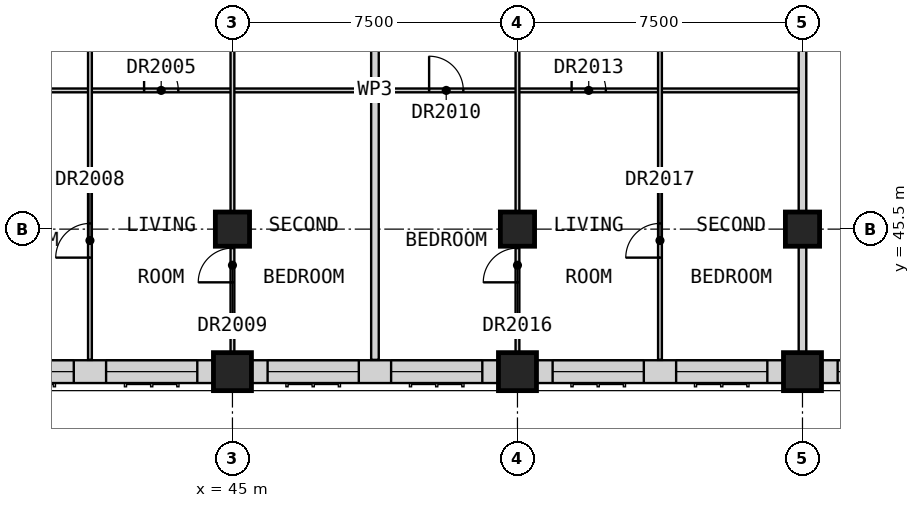
"""IFC4 building model, lengths in metres.
Left out: names, types, materials, properties, quantities, classifications, styles, units other than length and angle.
Written with IfcOpenShell. Run it as: python <this file> out.ifc"""

import sys

from ifc_helpers import new_model, si_unit, direction, frame, frame_2d, origin, origin_2d, place, context, subcontext, project, spatial, rectangle, extrude, element, fill, save


model = new_model("IFC4")
c1 = context("Model", 3, precision=1e-05, world=origin(), true_north=direction((0.0, 1.0)))
c2 = subcontext(c1, "Body", "Model", "MODEL_VIEW")
j1 = project(units=[si_unit("LENGTHUNIT", "METRE"), si_unit("PLANEANGLEUNIT", "RADIAN")], contexts=[c1])
p1 = place(None, origin())
s1 = spatial("IfcSite", under=j1, at=p1, CompositionType="ELEMENT")
p2 = place(p1, origin())
s2 = spatial("IfcBuilding", under=s1, at=p2, CompositionType="ELEMENT")
p3 = place(p2, frame((0.0, 0.0, 210.7)))
s3 = spatial("IfcBuildingStorey", under=s2, at=p3, CompositionType="ELEMENT", Elevation=210.7)
for number, where, z_axis, x_axis in (
    (1, (45.0, 41.75, 0.0), (0.0, 0.0, 1.0), (1.0, 0.0, 0.0)),
    (2, (52.5, 41.75, 0.0), (0.0, 0.0, 1.0), (1.0, 0.0, 0.0)),
    (3, (60.0, 41.75, 0.0), (0.0, 0.0, 1.0), (1.0, 0.0, 0.0)),
):
    element("IfcColumn", number, at=place(p3, frame(where, z_axis=z_axis, x_axis=x_axis)), inside=s3, PredefinedType="COLUMN", context=c2, shape_type="SweptSolid", body=[
        extrude(rectangle(XDim=1.0, YDim=1.0, at=origin_2d()), origin(), (0.0, 0.0, 1.0), 3.5),
    ])
for number, where, z_axis, x_axis in (
    (4, (45.0, 45.5, 0.0), (0.0, 0.0, 1.0), (1.0, 0.0, 0.0)),
    (5, (52.5, 45.5, 0.0), (0.0, 0.0, 1.0), (1.0, 0.0, 0.0)),
    (6, (60.0, 45.5, 0.0), (0.0, 0.0, 1.0), (1.0, 0.0, 0.0)),
):
    element("IfcColumn", number, at=place(p3, frame(where, z_axis=z_axis, x_axis=x_axis)), inside=s3, PredefinedType="COLUMN", context=c2, shape_type="SweptSolid", body=[
        extrude(rectangle(XDim=0.9, YDim=0.9, at=origin_2d()), origin(), (0.0, 0.0, 1.0), 3.5),
    ])
p4 = place(p3, frame((38.0, 41.75, 0.0), z_axis=(0.0, 0.0, 1.0), x_axis=(1.0, 0.0, 0.0)))
e7 = element("IfcWall", 7, at=p4, inside=s3, PredefinedType="SOLIDWALL", context=c2, shape_type="SweptSolid", body=[
    extrude(rectangle(XDim=6.5, YDim=0.6, at=frame_2d((3.25, 0.0))), origin(), (0.0, 0.0, 1.0), 2.75),
])
p5 = place(p4, frame((0.425, 0.0, 0.8)))
e8 = element("IfcOpeningElement", 8, at=p5, cuts=e7, PredefinedType="OPENING", context=c2, shape_type="SweptSolid", body=[
    extrude(rectangle(XDim=2.4, YDim=1.8, at=frame_2d((1.2, 0.9))), frame((0.0, 0.31, 0.0), z_axis=(0.0, -1.0, 0.0), x_axis=(1.0, 0.0, 0.0)), (0.0, 0.0, 1.0), 0.62),
])
p6 = place(p4, frame((3.675, 0.0, 0.8)))
e9 = element("IfcOpeningElement", 9, at=p6, cuts=e7, PredefinedType="OPENING", context=c2, shape_type="SweptSolid", body=[
    extrude(rectangle(XDim=2.4, YDim=1.8, at=frame_2d((1.2, 0.9))), frame((0.0, 0.31, 0.0), z_axis=(0.0, -1.0, 0.0), x_axis=(1.0, 0.0, 0.0)), (0.0, 0.0, 1.0), 0.62),
])
p7 = place(p3, frame((45.5, 41.75, 0.0), z_axis=(0.0, 0.0, 1.0), x_axis=(1.0, 0.0, 0.0)))
e10 = element("IfcWall", 10, at=p7, inside=s3, PredefinedType="SOLIDWALL", context=c2, shape_type="SweptSolid", body=[
    extrude(rectangle(XDim=6.5, YDim=0.6, at=frame_2d((3.25, 0.0))), origin(), (0.0, 0.0, 1.0), 2.75),
])
p8 = place(p7, frame((0.425, 0.0, 0.8)))
e11 = element("IfcOpeningElement", 11, at=p8, cuts=e10, PredefinedType="OPENING", context=c2, shape_type="SweptSolid", body=[
    extrude(rectangle(XDim=2.4, YDim=1.8, at=frame_2d((1.2, 0.9))), frame((0.0, 0.31, 0.0), z_axis=(0.0, -1.0, 0.0), x_axis=(1.0, 0.0, 0.0)), (0.0, 0.0, 1.0), 0.62),
])
p9 = place(p7, frame((3.675, 0.0, 0.8)))
e12 = element("IfcOpeningElement", 12, at=p9, cuts=e10, PredefinedType="OPENING", context=c2, shape_type="SweptSolid", body=[
    extrude(rectangle(XDim=2.4, YDim=1.8, at=frame_2d((1.2, 0.9))), frame((0.0, 0.31, 0.0), z_axis=(0.0, -1.0, 0.0), x_axis=(1.0, 0.0, 0.0)), (0.0, 0.0, 1.0), 0.62),
])
p10 = place(p3, frame((53.0, 41.75, 0.0), z_axis=(0.0, 0.0, 1.0), x_axis=(1.0, 0.0, 0.0)))
e13 = element("IfcWall", 13, at=p10, inside=s3, PredefinedType="SOLIDWALL", context=c2, shape_type="SweptSolid", body=[
    extrude(rectangle(XDim=6.5, YDim=0.6, at=frame_2d((3.25, 0.0))), origin(), (0.0, 0.0, 1.0), 2.75),
])
p11 = place(p10, frame((0.425, 0.0, 0.8)))
e14 = element("IfcOpeningElement", 14, at=p11, cuts=e13, PredefinedType="OPENING", context=c2, shape_type="SweptSolid", body=[
    extrude(rectangle(XDim=2.4, YDim=1.8, at=frame_2d((1.2, 0.9))), frame((0.0, 0.31, 0.0), z_axis=(0.0, -1.0, 0.0), x_axis=(1.0, 0.0, 0.0)), (0.0, 0.0, 1.0), 0.62),
])
p12 = place(p10, frame((3.675, 0.0, 0.8)))
e15 = element("IfcOpeningElement", 15, at=p12, cuts=e13, PredefinedType="OPENING", context=c2, shape_type="SweptSolid", body=[
    extrude(rectangle(XDim=2.4, YDim=1.8, at=frame_2d((1.2, 0.9))), frame((0.0, 0.31, 0.0), z_axis=(0.0, -1.0, 0.0), x_axis=(1.0, 0.0, 0.0)), (0.0, 0.0, 1.0), 0.62),
])
p13 = place(p3, frame((60.5, 41.75, 0.0), z_axis=(0.0, 0.0, 1.0), x_axis=(1.0, 0.0, 0.0)))
e16 = element("IfcWall", 16, at=p13, inside=s3, PredefinedType="SOLIDWALL", context=c2, shape_type="SweptSolid", body=[
    extrude(rectangle(XDim=6.5, YDim=0.6, at=frame_2d((3.25, 0.0))), origin(), (0.0, 0.0, 1.0), 2.75),
])
p14 = place(p13, frame((0.425, 0.0, 0.8)))
e17 = element("IfcOpeningElement", 17, at=p14, cuts=e16, PredefinedType="OPENING", context=c2, shape_type="SweptSolid", body=[
    extrude(rectangle(XDim=2.4, YDim=1.8, at=frame_2d((1.2, 0.9))), frame((0.0, 0.31, 0.0), z_axis=(0.0, -1.0, 0.0), x_axis=(1.0, 0.0, 0.0)), (0.0, 0.0, 1.0), 0.62),
])
p15 = place(p13, frame((3.675, 0.0, 0.8)))
e18 = element("IfcOpeningElement", 18, at=p15, cuts=e16, PredefinedType="OPENING", context=c2, shape_type="SweptSolid", body=[
    extrude(rectangle(XDim=2.4, YDim=1.8, at=frame_2d((1.2, 0.9))), frame((0.0, 0.31, 0.0), z_axis=(0.0, -1.0, 0.0), x_axis=(1.0, 0.0, 0.0)), (0.0, 0.0, 1.0), 0.62),
])
p16 = place(p3, frame((48.75, 42.06, 0.0), z_axis=(0.0, 0.0, 1.0), x_axis=(0.0, 1.0, 0.0)))
e19 = element("IfcWall", 19, at=p16, inside=s3, PredefinedType="PARTITIONING", context=c2, shape_type="SweptSolid", body=[
    extrude(rectangle(XDim=15.765, YDim=0.2, at=frame_2d((7.882, 0.0))), origin(), (0.0, 0.0, 1.0), 3.1),
])
p17 = place(p3, frame((60.0, 41.25, 0.0), z_axis=(0.0, 0.0, 1.0), x_axis=(0.0, 1.0, 0.0)))
e20 = element("IfcWall", 20, at=p17, inside=s3, PredefinedType="PARTITIONING", context=c2, shape_type="SweptSolid", body=[
    extrude(rectangle(XDim=16.575, YDim=0.2, at=frame_2d((8.288, 0.0))), origin(), (0.0, 0.0, 1.0), 3.1),
])
p18 = place(p3, frame((37.6, 49.15, 0.0), z_axis=(0.0, 0.0, 1.0), x_axis=(1.0, 0.0, 0.0)))
e21 = element("IfcWall", 21, at=p18, inside=s3, PredefinedType="PARTITIONING", context=c2, shape_type="SweptSolid", body=[
    extrude(rectangle(XDim=22.3, YDim=0.1, at=frame_2d((11.15, 0.0))), origin(), (0.0, 0.0, 1.0), 3.1),
])
p19 = place(p18, frame((1.325, 0.0, 0.0)))
e22 = element("IfcOpeningElement", 22, at=p19, cuts=e21, PredefinedType="OPENING", context=c2, shape_type="SweptSolid", body=[
    extrude(rectangle(XDim=0.9, YDim=2.1, at=frame_2d((0.45, 1.05))), frame((0.0, 0.06, 0.0), z_axis=(0.0, -1.0, 0.0), x_axis=(1.0, 0.0, 0.0)), (0.0, 0.0, 1.0), 0.12),
])
p20 = place(p18, frame((5.075, 0.0, 0.0)))
e23 = element("IfcOpeningElement", 23, at=p20, cuts=e21, PredefinedType="OPENING", context=c2, shape_type="SweptSolid", body=[
    extrude(rectangle(XDim=0.9, YDim=2.1, at=frame_2d((0.45, 1.05))), frame((0.0, 0.06, 0.0), z_axis=(0.0, -1.0, 0.0), x_axis=(1.0, 0.0, 0.0)), (0.0, 0.0, 1.0), 0.12),
])
p21 = place(p18, frame((12.575, 0.0, 0.0)))
e24 = element("IfcOpeningElement", 24, at=p21, cuts=e21, PredefinedType="OPENING", context=c2, shape_type="SweptSolid", body=[
    extrude(rectangle(XDim=0.9, YDim=2.1, at=frame_2d((0.45, 1.05))), frame((0.0, 0.06, 0.0), z_axis=(0.0, -1.0, 0.0), x_axis=(1.0, 0.0, 0.0)), (0.0, 0.0, 1.0), 0.12),
])
p22 = place(p18, frame((16.325, 0.0, 0.0)))
e25 = element("IfcOpeningElement", 25, at=p22, cuts=e21, PredefinedType="OPENING", context=c2, shape_type="SweptSolid", body=[
    extrude(rectangle(XDim=0.9, YDim=2.1, at=frame_2d((0.45, 1.05))), frame((0.0, 0.06, 0.0), z_axis=(0.0, -1.0, 0.0), x_axis=(1.0, 0.0, 0.0)), (0.0, 0.0, 1.0), 0.12),
])
p23 = place(p3, frame((41.25, 42.06, 0.0), z_axis=(0.0, 0.0, 1.0), x_axis=(0.0, 1.0, 0.0)))
e26 = element("IfcWall", 26, at=p23, inside=s3, PredefinedType="PARTITIONING", context=c2, shape_type="SweptSolid", body=[
    extrude(rectangle(XDim=11.402, YDim=0.1, at=frame_2d((5.701, 0.0))), origin(), (0.0, 0.0, 1.0), 3.1),
])
p24 = place(p23, frame((2.69, 0.0, 0.0)))
e27 = element("IfcOpeningElement", 27, at=p24, cuts=e26, PredefinedType="OPENING", context=c2, shape_type="SweptSolid", body=[
    extrude(rectangle(XDim=0.9, YDim=2.1, at=frame_2d((0.45, 1.05))), frame((0.0, 0.06, 0.0), z_axis=(0.0, -1.0, 0.0), x_axis=(1.0, 0.0, 0.0)), (0.0, 0.0, 1.0), 0.12),
])
p25 = place(p3, frame((45.0, 41.25, 0.0), z_axis=(0.0, 0.0, 1.0), x_axis=(0.0, 1.0, 0.0)))
e28 = element("IfcWall", 28, at=p25, inside=s3, PredefinedType="PARTITIONING", context=c2, shape_type="SweptSolid", body=[
    extrude(rectangle(XDim=12.212, YDim=0.1, at=frame_2d((6.106, 0.0))), origin(), (0.0, 0.0, 1.0), 3.1),
])
p26 = place(p25, frame((9.637, 0.0, 0.0)))
e29 = element("IfcOpeningElement", 29, at=p26, cuts=e28, PredefinedType="OPENING", context=c2, shape_type="SweptSolid", body=[
    extrude(rectangle(XDim=0.9, YDim=2.1, at=frame_2d((0.45, 1.05))), frame((0.0, 0.06, 0.0), z_axis=(0.0, -1.0, 0.0), x_axis=(1.0, 0.0, 0.0)), (0.0, 0.0, 1.0), 0.12),
])
p27 = place(p25, frame((2.85, 0.0, 0.0)))
e30 = element("IfcOpeningElement", 30, at=p27, cuts=e28, PredefinedType="OPENING", context=c2, shape_type="SweptSolid", body=[
    extrude(rectangle(XDim=0.9, YDim=2.1, at=frame_2d((0.45, 1.05))), frame((0.0, 0.06, 0.0), z_axis=(0.0, -1.0, 0.0), x_axis=(1.0, 0.0, 0.0)), (0.0, 0.0, 1.0), 0.12),
])
p28 = place(p3, frame((52.5, 41.25, 0.0), z_axis=(0.0, 0.0, 1.0), x_axis=(0.0, 1.0, 0.0)))
e31 = element("IfcWall", 31, at=p28, inside=s3, PredefinedType="PARTITIONING", context=c2, shape_type="SweptSolid", body=[
    extrude(rectangle(XDim=12.212, YDim=0.1, at=frame_2d((6.106, 0.0))), origin(), (0.0, 0.0, 1.0), 3.1),
])
p29 = place(p28, frame((2.85, 0.0, 0.0)))
e32 = element("IfcOpeningElement", 32, at=p29, cuts=e31, PredefinedType="OPENING", context=c2, shape_type="SweptSolid", body=[
    extrude(rectangle(XDim=0.9, YDim=2.1, at=frame_2d((0.45, 1.05))), frame((0.0, 0.06, 0.0), z_axis=(0.0, -1.0, 0.0), x_axis=(1.0, 0.0, 0.0)), (0.0, 0.0, 1.0), 0.12),
])
p30 = place(p3, frame((56.25, 42.06, 0.0), z_axis=(0.0, 0.0, 1.0), x_axis=(0.0, 1.0, 0.0)))
e33 = element("IfcWall", 33, at=p30, inside=s3, PredefinedType="PARTITIONING", context=c2, shape_type="SweptSolid", body=[
    extrude(rectangle(XDim=11.402, YDim=0.1, at=frame_2d((5.701, 0.0))), origin(), (0.0, 0.0, 1.0), 3.1),
])
p31 = place(p30, frame((8.827, 0.0, 0.0)))
e34 = element("IfcOpeningElement", 34, at=p31, cuts=e33, PredefinedType="OPENING", context=c2, shape_type="SweptSolid", body=[
    extrude(rectangle(XDim=0.9, YDim=2.1, at=frame_2d((0.45, 1.05))), frame((0.0, 0.06, 0.0), z_axis=(0.0, -1.0, 0.0), x_axis=(1.0, 0.0, 0.0)), (0.0, 0.0, 1.0), 0.12),
])
p32 = place(p30, frame((2.69, 0.0, 0.0)))
e35 = element("IfcOpeningElement", 35, at=p32, cuts=e33, PredefinedType="OPENING", context=c2, shape_type="SweptSolid", body=[
    extrude(rectangle(XDim=0.9, YDim=2.1, at=frame_2d((0.45, 1.05))), frame((0.0, 0.06, 0.0), z_axis=(0.0, -1.0, 0.0), x_axis=(1.0, 0.0, 0.0)), (0.0, 0.0, 1.0), 0.12),
])
p33 = place(p5, origin())
e36 = element("IfcWindow", 36, at=p33, inside=s3, PartitioningType="SINGLE_PANEL", PredefinedType="WINDOW", context=c2, shape_type="SweptSolid", body=[
    extrude(rectangle(XDim=2.4, YDim=1.8, at=frame_2d((1.2, 0.9))), frame((0.0, -0.07, 0.0), z_axis=(0.0, -1.0, 0.0), x_axis=(1.0, 0.0, 0.0)), (0.0, 0.0, 1.0), 0.06),
])
fill(e8, e36)
p34 = place(p6, origin())
e37 = element("IfcWindow", 37, at=p34, inside=s3, PartitioningType="SINGLE_PANEL", PredefinedType="WINDOW", context=c2, shape_type="SweptSolid", body=[
    extrude(rectangle(XDim=2.4, YDim=1.8, at=frame_2d((1.2, 0.9))), frame((0.0, -0.07, 0.0), z_axis=(0.0, -1.0, 0.0), x_axis=(1.0, 0.0, 0.0)), (0.0, 0.0, 1.0), 0.06),
])
fill(e9, e37)
p35 = place(p8, origin())
e38 = element("IfcWindow", 38, at=p35, inside=s3, PartitioningType="SINGLE_PANEL", PredefinedType="WINDOW", context=c2, shape_type="SweptSolid", body=[
    extrude(rectangle(XDim=2.4, YDim=1.8, at=frame_2d((1.2, 0.9))), frame((0.0, -0.07, 0.0), z_axis=(0.0, -1.0, 0.0), x_axis=(1.0, 0.0, 0.0)), (0.0, 0.0, 1.0), 0.06),
])
fill(e11, e38)
p36 = place(p9, origin())
e39 = element("IfcWindow", 39, at=p36, inside=s3, PartitioningType="SINGLE_PANEL", PredefinedType="WINDOW", context=c2, shape_type="SweptSolid", body=[
    extrude(rectangle(XDim=2.4, YDim=1.8, at=frame_2d((1.2, 0.9))), frame((0.0, -0.07, 0.0), z_axis=(0.0, -1.0, 0.0), x_axis=(1.0, 0.0, 0.0)), (0.0, 0.0, 1.0), 0.06),
])
fill(e12, e39)
p37 = place(p11, origin())
e40 = element("IfcWindow", 40, at=p37, inside=s3, PartitioningType="SINGLE_PANEL", PredefinedType="WINDOW", context=c2, shape_type="SweptSolid", body=[
    extrude(rectangle(XDim=2.4, YDim=1.8, at=frame_2d((1.2, 0.9))), frame((0.0, -0.07, 0.0), z_axis=(0.0, -1.0, 0.0), x_axis=(1.0, 0.0, 0.0)), (0.0, 0.0, 1.0), 0.06),
])
fill(e14, e40)
p38 = place(p12, origin())
e41 = element("IfcWindow", 41, at=p38, inside=s3, PartitioningType="SINGLE_PANEL", PredefinedType="WINDOW", context=c2, shape_type="SweptSolid", body=[
    extrude(rectangle(XDim=2.4, YDim=1.8, at=frame_2d((1.2, 0.9))), frame((0.0, -0.07, 0.0), z_axis=(0.0, -1.0, 0.0), x_axis=(1.0, 0.0, 0.0)), (0.0, 0.0, 1.0), 0.06),
])
fill(e15, e41)
p39 = place(p14, origin())
e42 = element("IfcWindow", 42, at=p39, inside=s3, PartitioningType="SINGLE_PANEL", PredefinedType="WINDOW", context=c2, shape_type="SweptSolid", body=[
    extrude(rectangle(XDim=2.4, YDim=1.8, at=frame_2d((1.2, 0.9))), frame((0.0, -0.07, 0.0), z_axis=(0.0, -1.0, 0.0), x_axis=(1.0, 0.0, 0.0)), (0.0, 0.0, 1.0), 0.06),
])
fill(e17, e42)
p40 = place(p20, origin())
e43 = element("IfcDoor", 43, at=p40, inside=s3, OperationType="SINGLE_SWING_LEFT", PredefinedType="DOOR", context=c2, shape_type="SweptSolid", body=[
    extrude(rectangle(XDim=0.9, YDim=2.1, at=frame_2d((0.45, 1.05))), frame((0.0, 0.025, 0.0), z_axis=(0.0, -1.0, 0.0), x_axis=(1.0, 0.0, 0.0)), (0.0, 0.0, 1.0), 0.05),
])
fill(e23, e43)
p41 = place(p24, origin())
e44 = element("IfcDoor", 44, at=p41, inside=s3, OperationType="SINGLE_SWING_LEFT", PredefinedType="DOOR", context=c2, shape_type="SweptSolid", body=[
    extrude(rectangle(XDim=0.9, YDim=2.1, at=frame_2d((0.45, 1.05))), frame((0.0, 0.025, 0.0), z_axis=(0.0, -1.0, 0.0), x_axis=(1.0, 0.0, 0.0)), (0.0, 0.0, 1.0), 0.05),
])
fill(e27, e44)
p42 = place(p27, origin())
e45 = element("IfcDoor", 45, at=p42, inside=s3, OperationType="SINGLE_SWING_LEFT", PredefinedType="DOOR", context=c2, shape_type="SweptSolid", body=[
    extrude(rectangle(XDim=0.9, YDim=2.1, at=frame_2d((0.45, 1.05))), frame((0.0, 0.025, 0.0), z_axis=(0.0, -1.0, 0.0), x_axis=(1.0, 0.0, 0.0)), (0.0, 0.0, 1.0), 0.05),
])
fill(e30, e45)
p43 = place(p21, origin())
e46 = element("IfcDoor", 46, at=p43, inside=s3, OperationType="SINGLE_SWING_LEFT", PredefinedType="DOOR", context=c2, shape_type="SweptSolid", body=[
    extrude(rectangle(XDim=0.9, YDim=2.1, at=frame_2d((0.45, 1.05))), frame((0.0, 0.025, 0.0), z_axis=(0.0, -1.0, 0.0), x_axis=(1.0, 0.0, 0.0)), (0.0, 0.0, 1.0), 0.05),
])
fill(e24, e46)
p44 = place(p22, origin())
e47 = element("IfcDoor", 47, at=p44, inside=s3, OperationType="SINGLE_SWING_LEFT", PredefinedType="DOOR", context=c2, shape_type="SweptSolid", body=[
    extrude(rectangle(XDim=0.9, YDim=2.1, at=frame_2d((0.45, 1.05))), frame((0.0, 0.025, 0.0), z_axis=(0.0, -1.0, 0.0), x_axis=(1.0, 0.0, 0.0)), (0.0, 0.0, 1.0), 0.05),
])
fill(e25, e47)
p45 = place(p29, origin())
e48 = element("IfcDoor", 48, at=p45, inside=s3, OperationType="SINGLE_SWING_LEFT", PredefinedType="DOOR", context=c2, shape_type="SweptSolid", body=[
    extrude(rectangle(XDim=0.9, YDim=2.1, at=frame_2d((0.45, 1.05))), frame((0.0, 0.025, 0.0), z_axis=(0.0, -1.0, 0.0), x_axis=(1.0, 0.0, 0.0)), (0.0, 0.0, 1.0), 0.05),
])
fill(e32, e48)
p46 = place(p32, origin())
e49 = element("IfcDoor", 49, at=p46, inside=s3, OperationType="SINGLE_SWING_LEFT", PredefinedType="DOOR", context=c2, shape_type="SweptSolid", body=[
    extrude(rectangle(XDim=0.9, YDim=2.1, at=frame_2d((0.45, 1.05))), frame((0.0, 0.025, 0.0), z_axis=(0.0, -1.0, 0.0), x_axis=(1.0, 0.0, 0.0)), (0.0, 0.0, 1.0), 0.05),
])
fill(e35, e49)
save(model, sys.argv[1])
